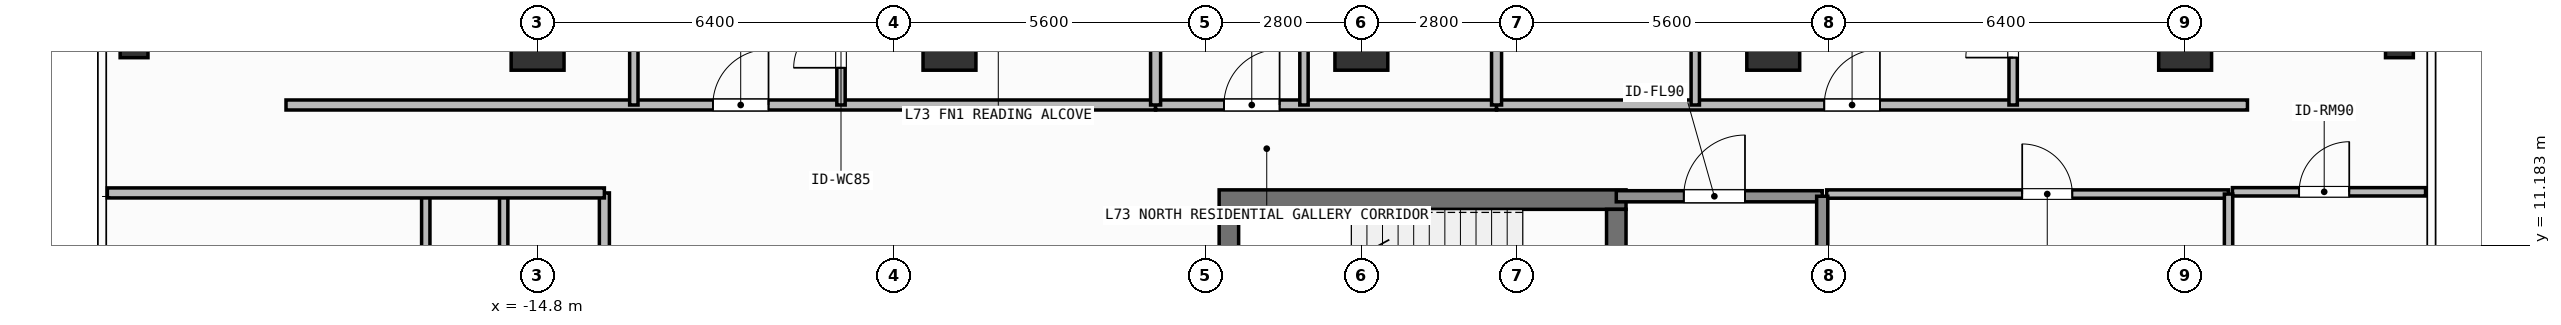
"""IFC4 building model, lengths in metres.
Left out: names, types, materials, properties, quantities, classifications, styles, units other than length and angle.
Written with IfcOpenShell. Run it as: python <this file> out.ifc"""

import sys

from ifc_helpers import new_model, si_unit, direction, frame, frame_2d, origin, origin_2d, place, context, subcontext, project, spatial, rectangle, hollow_rectangle, extrude, element, fill, save


model = new_model("IFC4")
c1 = context("Model", 3, precision=1e-05, world=origin(), true_north=direction((0.0, 1.0)))
c2 = subcontext(c1, "Body", "Model", "MODEL_VIEW")
j1 = project(units=[si_unit("LENGTHUNIT", "METRE"), si_unit("PLANEANGLEUNIT", "RADIAN")], contexts=[c1])
p1 = place(None, origin())
s1 = spatial("IfcSite", under=j1, at=p1, CompositionType="ELEMENT")
p2 = place(p1, origin())
s2 = spatial("IfcBuilding", under=s1, at=p2, CompositionType="ELEMENT")
p3 = place(p2, frame((0.0, 0.0, 297.6)))
s3 = spatial("IfcBuildingStorey", under=s2, at=p3, CompositionType="ELEMENT", Elevation=297.6)
p4 = place(p3, frame((-2.555, 12.0, 0.0), z_axis=(0.0, 0.0, 1.0), x_axis=(1.0, 0.0, 0.0)))
e1 = element("IfcWall", 1, at=p4, inside=s3, PredefinedType="SHEAR", context=c2, shape_type="SweptSolid", body=[
    extrude(rectangle(XDim=7.31, YDim=0.35, at=frame_2d((3.655, 0.0))), origin(), (0.0, 0.0, 1.0), 3.9),
])
p5 = place(p3, frame((-2.38, 8.9, 0.0), z_axis=(0.0, 0.0, 1.0), x_axis=(0.0, 1.0, 0.0)))
e2 = element("IfcWall", 2, at=p5, inside=s3, PredefinedType="SHEAR", context=c2, shape_type="SweptSolid", body=[
    extrude(rectangle(XDim=2.925, YDim=0.35, at=frame_2d((1.462, 0.0))), origin(), (0.0, 0.0, 1.0), 3.9),
])
p6 = place(p3, frame((4.58, 11.825, 0.0), z_axis=(0.0, 0.0, 1.0), x_axis=(0.0, -1.0, 0.0)))
e3 = element("IfcWall", 3, at=p6, inside=s3, PredefinedType="SHEAR", context=c2, shape_type="SweptSolid", body=[
    extrude(rectangle(XDim=2.925, YDim=0.35, at=frame_2d((1.462, 0.0))), origin(), (0.0, 0.0, 1.0), 3.9),
])
p7 = place(p6, frame((0.913, 0.0, 0.0)))
e4 = element("IfcOpeningElement", 4, at=p7, cuts=e3, PredefinedType="OPENING", context=c2, shape_type="SweptSolid", body=[
    extrude(rectangle(XDim=1.1, YDim=2.15, at=frame_2d((0.55, 1.075))), frame((0.0, 0.185, 0.0), z_axis=(0.0, -1.0, 0.0), x_axis=(1.0, 0.0, 0.0)), (0.0, 0.0, 1.0), 0.37),
])
for number, where, z_axis, x_axis in (
    (5, (-14.8, 14.8, 0.0), (0.0, 0.0, 1.0), (1.0, 0.0, 0.0)),
    (6, (-7.4, 14.8, 0.0), (0.0, 0.0, 1.0), (1.0, 0.0, 0.0)),
    (7, (0.0, 14.8, 0.0), (0.0, 0.0, 1.0), (1.0, 0.0, 0.0)),
    (8, (7.4, 14.8, 0.0), (0.0, 0.0, 1.0), (1.0, 0.0, 0.0)),
    (9, (14.8, 14.8, 0.0), (0.0, 0.0, 1.0), (1.0, 0.0, 0.0)),
):
    element("IfcColumn", number, at=place(p3, frame(where, z_axis=z_axis, x_axis=x_axis)), inside=s3, PredefinedType="COLUMN", context=c2, shape_type="SweptSolid", body=[
        extrude(rectangle(XDim=0.95, YDim=0.95, at=origin_2d()), origin(), (0.0, 0.0, 1.0), 3.9),
    ])
for number, where, z_axis, x_axis in (
    (10, (-22.05, 14.8, 0.0), (0.0, 0.0, 1.0), (1.0, 0.0, 0.0)),
    (11, (18.65, 14.8, 0.0), (0.0, 0.0, 1.0), (1.0, 0.0, 0.0)),
):
    element("IfcColumn", number, at=place(p3, frame(where, z_axis=z_axis, x_axis=x_axis)), inside=s3, PredefinedType="COLUMN", context=c2, shape_type="SweptSolid", body=[
        extrude(hollow_rectangle(XDim=0.5, YDim=0.5, WallThickness=0.025, at=origin_2d()), origin(), (0.0, 0.0, 1.0), 3.9),
    ])
p8 = place(p3, frame((4.58, 12.06, 0.0), z_axis=(0.0, 0.0, 1.0), x_axis=(1.0, 0.0, 0.0)))
e12 = element("IfcWall", 12, at=p8, inside=s3, PredefinedType="SOLIDWALL", context=c2, shape_type="SweptSolid", body=[
    extrude(rectangle(XDim=3.7, YDim=0.2, at=frame_2d((1.85, 0.0))), origin(), (0.0, 0.0, 1.0), 3.68),
])
p9 = place(p8, frame((1.212, 0.0, 0.0)))
e13 = element("IfcOpeningElement", 13, at=p9, cuts=e12, PredefinedType="OPENING", context=c2, shape_type="SweptSolid", body=[
    extrude(rectangle(XDim=1.1, YDim=2.15, at=frame_2d((0.55, 1.075))), frame((0.0, 0.11, 0.0), z_axis=(0.0, -1.0, 0.0), x_axis=(1.0, 0.0, 0.0)), (0.0, 0.0, 1.0), 0.22),
])
p10 = place(p3, frame((8.36, 12.1, 0.0), z_axis=(0.0, 0.0, 1.0), x_axis=(1.0, 0.0, 0.0)))
e14 = element("IfcWall", 14, at=p10, inside=s3, PredefinedType="PARTITIONING", context=c2, shape_type="SweptSolid", body=[
    extrude(rectangle(XDim=7.22, YDim=0.15, at=frame_2d((3.61, 0.0))), origin(), (0.0, 0.0, 1.0), 3.68),
])
p11 = place(p10, frame((3.513, 0.0, 0.0)))
e15 = element("IfcOpeningElement", 15, at=p11, cuts=e14, PredefinedType="OPENING", context=c2, shape_type="SweptSolid", body=[
    extrude(rectangle(XDim=0.9, YDim=2.1, at=frame_2d((0.45, 1.05))), frame((0.0, 0.085, 0.0), z_axis=(0.0, -1.0, 0.0), x_axis=(1.0, 0.0, 0.0)), (0.0, 0.0, 1.0), 0.17),
])
p12 = place(p3, frame((-19.32, 13.7, 0.0), z_axis=(0.0, 0.0, 1.0), x_axis=(1.0, 0.0, 0.0)))
e16 = element("IfcWall", 16, at=p12, inside=s3, PredefinedType="PARTITIONING", context=c2, shape_type="SweptSolid", body=[
    extrude(rectangle(XDim=15.623, YDim=0.18, at=frame_2d((7.812, 0.0))), origin(), (0.0, 0.0, 1.0), 3.68),
])
p13 = place(p12, frame((7.669, 0.0, 0.0)))
e17 = element("IfcOpeningElement", 17, at=p13, cuts=e16, PredefinedType="OPENING", context=c2, shape_type="SweptSolid", body=[
    extrude(rectangle(XDim=1.0, YDim=2.2, at=frame_2d((0.5, 1.1))), frame((0.0, 0.1, 0.0), z_axis=(0.0, -1.0, 0.0), x_axis=(1.0, 0.0, 0.0)), (0.0, 0.0, 1.0), 0.2),
])
p14 = place(p3, frame((-13.071, 13.7, 0.0), z_axis=(0.0, 0.0, 1.0), x_axis=(0.0, 1.0, 0.0)))
e18 = element("IfcWall", 18, at=p14, inside=s3, PredefinedType="PARTITIONING", context=c2, shape_type="SweptSolid", body=[
    extrude(rectangle(XDim=3.604, YDim=0.15, at=frame_2d((1.802, 0.0))), origin(), (0.0, 0.0, 1.0), 3.68),
])
p15 = place(p14, frame((1.725, 0.0, 0.0)))
e19 = element("IfcOpeningElement", 19, at=p15, cuts=e18, PredefinedType="OPENING", context=c2, shape_type="SweptSolid", body=[
    extrude(rectangle(XDim=0.85, YDim=2.1, at=frame_2d((0.425, 1.05))), frame((0.0, 0.085, 0.0), z_axis=(0.0, -1.0, 0.0), x_axis=(1.0, 0.0, 0.0)), (0.0, 0.0, 1.0), 0.17),
])
p16 = place(p3, frame((-9.349, 13.7, 0.0), z_axis=(0.0, 0.0, 1.0), x_axis=(0.0, 1.0, 0.0)))
e20 = element("IfcWall", 20, at=p16, inside=s3, PredefinedType="PARTITIONING", context=c2, shape_type="SweptSolid", body=[
    extrude(rectangle(XDim=2.018, YDim=0.15, at=frame_2d((1.009, 0.0))), origin(), (0.0, 0.0, 1.0), 3.68),
])
p17 = place(p16, frame((0.669, 0.0, 0.0)))
e21 = element("IfcOpeningElement", 21, at=p17, cuts=e20, PredefinedType="OPENING", context=c2, shape_type="SweptSolid", body=[
    extrude(rectangle(XDim=0.85, YDim=2.1, at=frame_2d((0.425, 1.05))), frame((0.0, 0.085, 0.0), z_axis=(0.0, -1.0, 0.0), x_axis=(1.0, 0.0, 0.0)), (0.0, 0.0, 1.0), 0.17),
])
p18 = place(p3, frame((-3.697, 13.7, 0.0), z_axis=(0.0, 0.0, 1.0), x_axis=(1.0, 0.0, 0.0)))
e22 = element("IfcWall", 22, at=p18, inside=s3, PredefinedType="PARTITIONING", context=c2, shape_type="SweptSolid", body=[
    extrude(rectangle(XDim=6.126, YDim=0.18, at=frame_2d((3.063, 0.0))), origin(), (0.0, 0.0, 1.0), 3.68),
])
p19 = place(p18, frame((1.228, 0.0, 0.0)))
e23 = element("IfcOpeningElement", 23, at=p19, cuts=e22, PredefinedType="OPENING", context=c2, shape_type="SweptSolid", body=[
    extrude(rectangle(XDim=1.0, YDim=2.2, at=frame_2d((0.5, 1.1))), frame((0.0, 0.1, 0.0), z_axis=(0.0, -1.0, 0.0), x_axis=(1.0, 0.0, 0.0)), (0.0, 0.0, 1.0), 0.2),
])
p20 = place(p3, frame((-1.031, 13.7, 0.0), z_axis=(0.0, 0.0, 1.0), x_axis=(0.0, 1.0, 0.0)))
e24 = element("IfcWall", 24, at=p20, inside=s3, PredefinedType="PARTITIONING", context=c2, shape_type="SweptSolid", body=[
    extrude(rectangle(XDim=2.281, YDim=0.15, at=frame_2d((1.141, 0.0))), origin(), (0.0, 0.0, 1.0), 3.68),
])
p21 = place(p3, frame((2.429, 13.7, 0.0), z_axis=(0.0, 0.0, 1.0), x_axis=(1.0, 0.0, 0.0)))
e25 = element("IfcWall", 25, at=p21, inside=s3, PredefinedType="PARTITIONING", context=c2, shape_type="SweptSolid", body=[
    extrude(rectangle(XDim=13.491, YDim=0.18, at=frame_2d((6.746, 0.0))), origin(), (0.0, 0.0, 1.0), 3.68),
])
p22 = place(p21, frame((5.887, 0.0, 0.0)))
e26 = element("IfcOpeningElement", 26, at=p22, cuts=e25, PredefinedType="OPENING", context=c2, shape_type="SweptSolid", body=[
    extrude(rectangle(XDim=1.0, YDim=2.2, at=frame_2d((0.5, 1.1))), frame((0.0, 0.1, 0.0), z_axis=(0.0, -1.0, 0.0), x_axis=(1.0, 0.0, 0.0)), (0.0, 0.0, 1.0), 0.2),
])
p23 = place(p3, frame((5.999, 13.7, 0.0), z_axis=(0.0, 0.0, 1.0), x_axis=(0.0, 1.0, 0.0)))
e27 = element("IfcWall", 27, at=p23, inside=s3, PredefinedType="PARTITIONING", context=c2, shape_type="SweptSolid", body=[
    extrude(rectangle(XDim=4.25, YDim=0.15, at=frame_2d((2.125, 0.0))), origin(), (0.0, 0.0, 1.0), 3.68),
])
p24 = place(p23, frame((1.7, 0.0, 0.0)))
e28 = element("IfcOpeningElement", 28, at=p24, cuts=e27, PredefinedType="OPENING", context=c2, shape_type="SweptSolid", body=[
    extrude(rectangle(XDim=0.85, YDim=2.1, at=frame_2d((0.425, 1.05))), frame((0.0, 0.085, 0.0), z_axis=(0.0, -1.0, 0.0), x_axis=(1.0, 0.0, 0.0)), (0.0, 0.0, 1.0), 0.17),
])
p25 = place(p3, frame((11.71, 13.7, 0.0), z_axis=(0.0, 0.0, 1.0), x_axis=(0.0, 1.0, 0.0)))
e29 = element("IfcWall", 29, at=p25, inside=s3, PredefinedType="PARTITIONING", context=c2, shape_type="SweptSolid", body=[
    extrude(rectangle(XDim=2.38, YDim=0.15, at=frame_2d((1.19, 0.0))), origin(), (0.0, 0.0, 1.0), 3.68),
])
p26 = place(p25, frame((0.851, 0.0, 0.0)))
e30 = element("IfcOpeningElement", 30, at=p26, cuts=e29, PredefinedType="OPENING", context=c2, shape_type="SweptSolid", body=[
    extrude(rectangle(XDim=0.85, YDim=2.1, at=frame_2d((0.425, 1.05))), frame((0.0, 0.085, 0.0), z_axis=(0.0, -1.0, 0.0), x_axis=(1.0, 0.0, 0.0)), (0.0, 0.0, 1.0), 0.17),
])
p27 = place(p3, frame((-13.6, 4.04, 0.0), z_axis=(0.0, 0.0, 1.0), x_axis=(0.0, 1.0, 0.0)))
e31 = element("IfcWall", 31, at=p27, inside=s3, PredefinedType="PARTITIONING", context=c2, shape_type="SweptSolid", body=[
    extrude(rectangle(XDim=8.08, YDim=0.18, at=frame_2d((4.04, 0.0))), origin(), (0.0, 0.0, 1.0), 3.68),
])
p28 = place(p27, frame((1.761, 0.0, 0.0)))
e32 = element("IfcOpeningElement", 32, at=p28, cuts=e31, PredefinedType="OPENING", context=c2, shape_type="SweptSolid", body=[
    extrude(rectangle(XDim=1.0, YDim=2.2, at=frame_2d((0.5, 1.1))), frame((0.0, 0.1, 0.0), z_axis=(0.0, -1.0, 0.0), x_axis=(1.0, 0.0, 0.0)), (0.0, 0.0, 1.0), 0.2),
])
p29 = place(p3, frame((15.65, 12.14, 0.0), z_axis=(0.0, 0.0, 1.0), x_axis=(1.0, 0.0, 0.0)))
e33 = element("IfcWall", 33, at=p29, inside=s3, PredefinedType="PARTITIONING", context=c2, shape_type="SweptSolid", body=[
    extrude(rectangle(XDim=3.47, YDim=0.15, at=frame_2d((1.735, 0.0))), origin(), (0.0, 0.0, 1.0), 3.68),
])
p30 = place(p29, frame((1.198, 0.0, 0.0)))
e34 = element("IfcOpeningElement", 34, at=p30, cuts=e33, PredefinedType="OPENING", context=c2, shape_type="SweptSolid", body=[
    extrude(rectangle(XDim=0.9, YDim=2.1, at=frame_2d((0.45, 1.05))), frame((0.0, 0.085, 0.0), z_axis=(0.0, -1.0, 0.0), x_axis=(1.0, 0.0, 0.0)), (0.0, 0.0, 1.0), 0.17),
])
p31 = place(p3, frame((8.28, 8.725, 0.0), z_axis=(0.0, 0.0, 1.0), x_axis=(0.0, 1.0, 0.0)))
e35 = element("IfcWall", 35, at=p31, inside=s3, PredefinedType="SOLIDWALL", context=c2, shape_type="SweptSolid", body=[
    extrude(rectangle(XDim=3.335, YDim=0.2, at=frame_2d((1.667, 0.0))), origin(), (0.0, 0.0, 1.0), 3.68),
])
p32 = place(p3, frame((15.58, 5.85, 0.0), z_axis=(0.0, 0.0, 1.0), x_axis=(0.0, 1.0, 0.0)))
e36 = element("IfcWall", 36, at=p32, inside=s3, PredefinedType="PARTITIONING", context=c2, shape_type="SweptSolid", body=[
    extrude(rectangle(XDim=6.25, YDim=0.15, at=frame_2d((3.125, 0.0))), origin(), (0.0, 0.0, 1.0), 3.68),
])
for number, where, z_axis, x_axis in (
    (37, (-3.697, 13.7, 0.0), (0.0, 0.0, 1.0), (0.0, 1.0, 0.0)),
    (38, (2.429, 13.7, 0.0), (0.0, 0.0, 1.0), (0.0, 1.0, 0.0)),
):
    element("IfcWall", number, at=place(p3, frame(where, z_axis=z_axis, x_axis=x_axis)), inside=s3, PredefinedType="PARTITIONING", context=c2, shape_type="SweptSolid", body=[
        extrude(rectangle(XDim=7.33, YDim=0.18, at=frame_2d((3.665, 0.0))), origin(), (0.0, 0.0, 1.0), 3.68),
    ])
for number, where, z_axis, x_axis in (
    (39, (-15.409, 9.32, 0.0), (0.0, 0.0, 1.0), (0.0, 1.0, 0.0)),
    (40, (-16.809, 9.32, 0.0), (0.0, 0.0, 1.0), (0.0, 1.0, 0.0)),
):
    element("IfcWall", number, at=place(p3, frame(where, z_axis=z_axis, x_axis=x_axis)), inside=s3, PredefinedType="PARTITIONING", context=c2, shape_type="SweptSolid", body=[
        extrude(rectangle(XDim=2.8, YDim=0.15, at=frame_2d((1.4, 0.0))), origin(), (0.0, 0.0, 1.0), 3.68),
    ])
p33 = place(p3, frame((-22.53, 12.12, 0.0), z_axis=(0.0, 0.0, 1.0), x_axis=(1.0, 0.0, 0.0)))
e41 = element("IfcWall", 41, at=p33, inside=s3, PredefinedType="PARTITIONING", context=c2, shape_type="SweptSolid", body=[
    extrude(rectangle(XDim=8.93, YDim=0.18, at=frame_2d((4.465, 0.0))), origin(), (0.0, 0.0, 1.0), 3.68),
])
p34 = place(p9, origin())
e42 = element("IfcDoor", 42, at=p34, inside=s3, OperationType="SINGLE_SWING_RIGHT", PredefinedType="DOOR", context=c2, shape_type="SweptSolid", body=[
    extrude(rectangle(XDim=1.1, YDim=2.15, at=frame_2d((0.55, 1.075))), frame((0.0, 0.025, 0.0), z_axis=(0.0, -1.0, 0.0), x_axis=(1.0, 0.0, 0.0)), (0.0, 0.0, 1.0), 0.05),
])
fill(e13, e42)
p35 = place(p11, origin())
e43 = element("IfcDoor", 43, at=p35, inside=s3, OperationType="SINGLE_SWING_LEFT", PredefinedType="DOOR", context=c2, shape_type="SweptSolid", body=[
    extrude(rectangle(XDim=0.9, YDim=2.1, at=frame_2d((0.45, 1.05))), frame((0.0, 0.025, 0.0), z_axis=(0.0, -1.0, 0.0), x_axis=(1.0, 0.0, 0.0)), (0.0, 0.0, 1.0), 0.05),
])
fill(e15, e43)
p36 = place(p13, origin())
e44 = element("IfcDoor", 44, at=p36, inside=s3, OperationType="SINGLE_SWING_RIGHT", PredefinedType="DOOR", context=c2, shape_type="SweptSolid", body=[
    extrude(rectangle(XDim=1.0, YDim=2.2, at=frame_2d((0.5, 1.1))), frame((0.0, 0.025, 0.0), z_axis=(0.0, -1.0, 0.0), x_axis=(1.0, 0.0, 0.0)), (0.0, 0.0, 1.0), 0.05),
])
fill(e17, e44)
p37 = place(p17, origin())
e45 = element("IfcDoor", 45, at=p37, inside=s3, OperationType="SINGLE_SWING_LEFT", PredefinedType="DOOR", context=c2, shape_type="SweptSolid", body=[
    extrude(rectangle(XDim=0.85, YDim=2.1, at=frame_2d((0.425, 1.05))), frame((0.0, 0.025, 0.0), z_axis=(0.0, -1.0, 0.0), x_axis=(1.0, 0.0, 0.0)), (0.0, 0.0, 1.0), 0.05),
])
fill(e21, e45)
p38 = place(p19, origin())
e46 = element("IfcDoor", 46, at=p38, inside=s3, OperationType="SINGLE_SWING_RIGHT", PredefinedType="DOOR", context=c2, shape_type="SweptSolid", body=[
    extrude(rectangle(XDim=1.0, YDim=2.2, at=frame_2d((0.5, 1.1))), frame((0.0, 0.025, 0.0), z_axis=(0.0, -1.0, 0.0), x_axis=(1.0, 0.0, 0.0)), (0.0, 0.0, 1.0), 0.05),
])
fill(e23, e46)
p39 = place(p22, origin())
e47 = element("IfcDoor", 47, at=p39, inside=s3, OperationType="SINGLE_SWING_RIGHT", PredefinedType="DOOR", context=c2, shape_type="SweptSolid", body=[
    extrude(rectangle(XDim=1.0, YDim=2.2, at=frame_2d((0.5, 1.1))), frame((0.0, 0.025, 0.0), z_axis=(0.0, -1.0, 0.0), x_axis=(1.0, 0.0, 0.0)), (0.0, 0.0, 1.0), 0.05),
])
fill(e26, e47)
p40 = place(p26, origin())
e48 = element("IfcDoor", 48, at=p40, inside=s3, OperationType="SINGLE_SWING_LEFT", PredefinedType="DOOR", context=c2, shape_type="SweptSolid", body=[
    extrude(rectangle(XDim=0.85, YDim=2.1, at=frame_2d((0.425, 1.05))), frame((0.0, 0.025, 0.0), z_axis=(0.0, -1.0, 0.0), x_axis=(1.0, 0.0, 0.0)), (0.0, 0.0, 1.0), 0.05),
])
fill(e30, e48)
p41 = place(p30, origin())
e49 = element("IfcDoor", 49, at=p41, inside=s3, OperationType="SINGLE_SWING_RIGHT", PredefinedType="DOOR", context=c2, shape_type="SweptSolid", body=[
    extrude(rectangle(XDim=0.9, YDim=2.1, at=frame_2d((0.45, 1.05))), frame((0.0, 0.025, 0.0), z_axis=(0.0, -1.0, 0.0), x_axis=(1.0, 0.0, 0.0)), (0.0, 0.0, 1.0), 0.05),
])
fill(e34, e49)
save(model, sys.argv[1])
